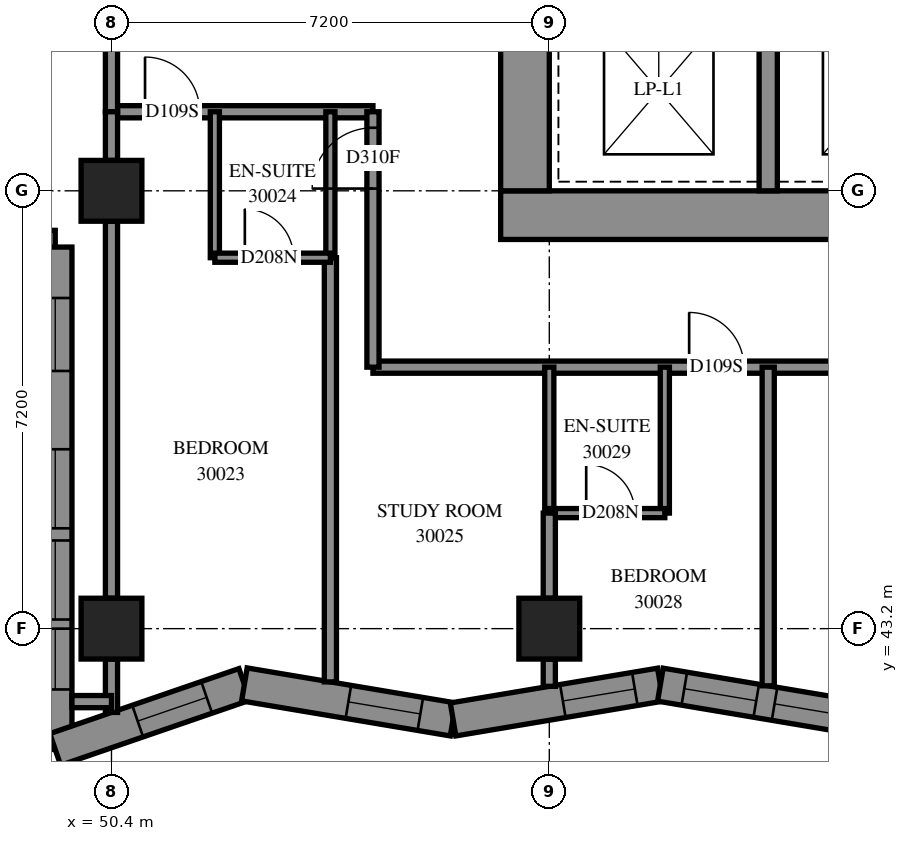
"""IFC4 building model, lengths in metres.
Left out: names, types, materials, properties, quantities, classifications, styles, units other than length and angle.
Written with IfcOpenShell. Run it as: python <this file> out.ifc"""

import sys

from ifc_helpers import new_model, si_unit, direction, frame, frame_2d, origin, origin_2d, place, context, subcontext, project, spatial, polyline, rectangle, outline, extrude, element, fill, save


model = new_model("IFC4")
c1 = context("Model", 3, precision=1e-05, world=origin(), true_north=direction((0.0, 1.0)))
c2 = subcontext(c1, "Body", "Model", "MODEL_VIEW")
j1 = project(units=[si_unit("LENGTHUNIT", "METRE"), si_unit("PLANEANGLEUNIT", "RADIAN")], contexts=[c1])
p1 = place(None, origin())
s1 = spatial("IfcSite", under=j1, at=p1, CompositionType="ELEMENT")
p2 = place(p1, origin())
s2 = spatial("IfcBuilding", under=s1, at=p2, CompositionType="ELEMENT")
p3 = place(p2, frame((0.0, 0.0, 111.8)))
s3 = spatial("IfcBuildingStorey", under=s2, at=p3, CompositionType="ELEMENT", Elevation=111.8)
for number, where, z_axis, x_axis in (
    (1, (50.4, 43.2, 0.0), (0.0, 0.0, 1.0), (1.0, 0.0, 0.0)),
    (2, (50.4, 50.4, 0.0), (0.0, 0.0, 1.0), (1.0, 0.0, 0.0)),
    (3, (57.6, 43.2, 0.0), (0.0, 0.0, 1.0), (1.0, 0.0, 0.0)),
):
    element("IfcColumn", number, at=place(p3, frame(where, z_axis=z_axis, x_axis=x_axis)), inside=s3, PredefinedType="COLUMN", context=c2, shape_type="SweptSolid", body=[
        extrude(rectangle(XDim=1.0, YDim=1.0, at=origin_2d()), origin(), (0.0, 0.0, 1.0), 3.1),
    ])
p4 = place(p3, frame((56.8, 50.0, -0.3), z_axis=(0.0, 0.0, 1.0), x_axis=(1.0, 0.0, 0.0)))
e4 = element("IfcWall", 4, at=p4, inside=s3, PredefinedType="SHEAR", context=c2, shape_type="SweptSolid", body=[
    extrude(rectangle(XDim=16.0, YDim=0.8, at=frame_2d((8.0, 0.0))), origin(), (0.0, 0.0, 1.0), 2.7),
])
p5 = place(p3, frame((57.2, 50.4, -0.3), z_axis=(0.0, 0.0, 1.0), x_axis=(0.0, 1.0, 0.0)))
e5 = element("IfcWall", 5, at=p5, inside=s3, PredefinedType="SHEAR", context=c2, shape_type="SweptSolid", body=[
    extrude(rectangle(XDim=14.4, YDim=0.8, at=frame_2d((7.2, 0.0))), origin(), (0.0, 0.0, 1.0), 2.7),
])
p6 = place(p5, frame((4.55, 0.0, 0.3)))
e6 = element("IfcOpeningElement", 6, at=p6, cuts=e5, PredefinedType="OPENING", context=c2, shape_type="SweptSolid", body=[
    extrude(rectangle(XDim=1.1, YDim=2.1, at=frame_2d((0.55, 1.05))), frame((0.0, 0.41, 0.0), z_axis=(0.0, -1.0, 0.0), x_axis=(1.0, 0.0, 0.0)), (0.0, 0.0, 1.0), 0.82),
])
p7 = place(p5, frame((11.35, 0.0, 0.3)))
e7 = element("IfcOpeningElement", 7, at=p7, cuts=e5, PredefinedType="OPENING", context=c2, shape_type="SweptSolid", body=[
    extrude(rectangle(XDim=1.1, YDim=2.1, at=frame_2d((0.55, 1.05))), frame((0.0, 0.41, 0.0), z_axis=(0.0, -1.0, 0.0), x_axis=(1.0, 0.0, 0.0)), (0.0, 0.0, 1.0), 0.82),
])
p8 = place(p3, frame((61.2, 50.4, 0.0), z_axis=(0.0, 0.0, 1.0), x_axis=(0.0, 1.0, 0.0)))
e8 = element("IfcWall", 8, at=p8, inside=s3, PredefinedType="SOLIDWALL", context=c2, shape_type="SweptSolid", body=[
    extrude(rectangle(XDim=3.3, YDim=0.3, at=frame_2d((1.65, 0.0))), origin(), (0.0, 0.0, 1.0), 3.1),
])
p9 = place(p3, frame((42.275, 49.475, 0.0), z_axis=(0.0, 0.0, 1.0), x_axis=(1.0, 0.0, 0.0)))
e9 = element("IfcWall", 9, at=p9, inside=s3, PredefinedType="SOLIDWALL", context=c2, shape_type="SweptSolid", body=[
    extrude(outline(polyline([(-0.275, -0.275), (6.925, -0.275), (7.475, 0.275), (0.275, 0.275), (-0.275, -0.275)])), origin(), (0.0, 0.0, 1.0), 3.1),
])
p10 = place(p9, frame((1.325, 0.0, 0.5)))
e10 = element("IfcOpeningElement", 10, at=p10, cuts=e9, PredefinedType="OPENING", context=c2, shape_type="SweptSolid", body=[
    extrude(rectangle(XDim=1.3, YDim=2.45, at=frame_2d((0.65, 1.225))), frame((0.0, 0.285, 0.0), z_axis=(0.0, -1.0, 0.0), x_axis=(1.0, 0.0, 0.0)), (0.0, 0.0, 1.0), 0.57),
])
p11 = place(p9, frame((2.825, 0.0, 0.5)))
e11 = element("IfcOpeningElement", 11, at=p11, cuts=e9, PredefinedType="OPENING", context=c2, shape_type="SweptSolid", body=[
    extrude(rectangle(XDim=1.3, YDim=2.45, at=frame_2d((0.65, 1.225))), frame((0.0, 0.285, 0.0), z_axis=(0.0, -1.0, 0.0), x_axis=(1.0, 0.0, 0.0)), (0.0, 0.0, 1.0), 0.57),
])
p12 = place(p9, frame((5.162, 0.0, 0.5)))
e12 = element("IfcOpeningElement", 12, at=p12, cuts=e9, PredefinedType="OPENING", context=c2, shape_type="SweptSolid", body=[
    extrude(rectangle(XDim=1.2, YDim=2.45, at=frame_2d((0.6, 1.225))), frame((0.0, 0.285, 0.0), z_axis=(0.0, -1.0, 0.0), x_axis=(1.0, 0.0, 0.0)), (0.0, 0.0, 1.0), 0.57),
])
p13 = place(p3, frame((49.475, 49.475, 0.0), z_axis=(0.0, 0.0, 1.0), x_axis=(0.0, -1.0, 0.0)))
e13 = element("IfcWall", 13, at=p13, inside=s3, PredefinedType="SOLIDWALL", context=c2, shape_type="SweptSolid", body=[
    extrude(outline(polyline([(0.275, -0.275), (8.647, -0.275), (7.876, 0.275), (-0.275, 0.275), (0.275, -0.275)])), origin(), (0.0, 0.0, 1.0), 3.1),
])
p14 = place(p13, frame((3.325, 0.0, 0.5)))
e14 = element("IfcOpeningElement", 14, at=p14, cuts=e13, PredefinedType="OPENING", context=c2, shape_type="SweptSolid", body=[
    extrude(rectangle(XDim=1.3, YDim=2.45, at=frame_2d((0.65, 1.225))), frame((0.0, 0.285, 0.0), z_axis=(0.0, -1.0, 0.0), x_axis=(1.0, 0.0, 0.0)), (0.0, 0.0, 1.0), 0.57),
])
p15 = place(p13, frame((4.825, 0.0, 0.5)))
e15 = element("IfcOpeningElement", 15, at=p15, cuts=e13, PredefinedType="OPENING", context=c2, shape_type="SweptSolid", body=[
    extrude(rectangle(XDim=1.3, YDim=2.45, at=frame_2d((0.65, 1.225))), frame((0.0, 0.285, 0.0), z_axis=(0.0, -1.0, 0.0), x_axis=(1.0, 0.0, 0.0)), (0.0, 0.0, 1.0), 0.57),
])
p16 = place(p13, frame((0.838, 0.0, 0.5)))
e16 = element("IfcOpeningElement", 16, at=p16, cuts=e13, PredefinedType="OPENING", context=c2, shape_type="SweptSolid", body=[
    extrude(rectangle(XDim=1.2, YDim=2.45, at=frame_2d((0.6, 1.225))), frame((0.0, 0.285, 0.0), z_axis=(0.0, -1.0, 0.0), x_axis=(1.0, 0.0, 0.0)), (0.0, 0.0, 1.0), 0.57),
])
p17 = place(p13, frame((6.275, 0.0, 0.45)))
e17 = element("IfcOpeningElement", 17, at=p17, cuts=e13, PredefinedType="OPENING", context=c2, shape_type="SweptSolid", body=[
    extrude(rectangle(XDim=1.0, YDim=2.5, at=frame_2d((0.5, 1.25))), frame((0.0, 0.285, 0.0), z_axis=(0.0, -1.0, 0.0), x_axis=(1.0, 0.0, 0.0)), (0.0, 0.0, 1.0), 0.57),
])
p18 = place(p3, frame((49.475, 41.213, 0.0), z_axis=(0.0, 0.0, 1.0), x_axis=(0.9456585559, 0.3251613379, 0.0)))
e18 = element("IfcWall", 18, at=p18, inside=s3, PredefinedType="SOLIDWALL", context=c2, shape_type="SweptSolid", body=[
    extrude(outline(polyline([(-0.385, -0.275), (3.219, -0.275), (3.359, 0.275), (0.385, 0.275), (-0.385, -0.275)])), origin(), (0.0, 0.0, 1.0), 3.1),
])
p19 = place(p18, frame((1.434, 0.0, 0.5)))
e19 = element("IfcOpeningElement", 19, at=p19, cuts=e18, PredefinedType="OPENING", context=c2, shape_type="SweptSolid", body=[
    extrude(rectangle(XDim=1.2, YDim=2.45, at=frame_2d((0.6, 1.225))), frame((0.0, 0.285, 0.0), z_axis=(0.0, -1.0, 0.0), x_axis=(1.0, 0.0, 0.0)), (0.0, 0.0, 1.0), 0.57),
])
p20 = place(p3, frame((52.585, 42.283, 0.0), z_axis=(0.0, 0.0, 1.0), x_axis=(0.9862084709, -0.1655078606, 0.0)))
e20 = element("IfcWall", 20, at=p20, inside=s3, PredefinedType="SOLIDWALL", context=c2, shape_type="SweptSolid", body=[
    extrude(outline(polyline([(0.07, -0.275), (3.526, -0.275), (3.434, 0.275), (-0.07, 0.275), (0.07, -0.275)])), origin(), (0.0, 0.0, 1.0), 3.1),
])
p21 = place(p20, frame((1.734, 0.0, 0.5)))
e21 = element("IfcOpeningElement", 21, at=p21, cuts=e20, PredefinedType="OPENING", context=c2, shape_type="SweptSolid", body=[
    extrude(rectangle(XDim=1.2, YDim=2.45, at=frame_2d((0.6, 1.225))), frame((0.0, 0.285, 0.0), z_axis=(0.0, -1.0, 0.0), x_axis=(1.0, 0.0, 0.0)), (0.0, 0.0, 1.0), 0.57),
])
p22 = place(p3, frame((56.018, 41.707, 0.0), z_axis=(0.0, 0.0, 1.0), x_axis=(0.9862119159, 0.1654873316, 0.0)))
e22 = element("IfcWall", 22, at=p22, inside=s3, PredefinedType="SOLIDWALL", context=c2, shape_type="SweptSolid", body=[
    extrude(outline(polyline([(-0.046, -0.275), (3.41, -0.275), (3.503, 0.275), (0.046, 0.275), (-0.046, -0.275)])), origin(), (0.0, 0.0, 1.0), 3.1),
])
p23 = place(p22, frame((1.831, 0.0, 0.5)))
e23 = element("IfcOpeningElement", 23, at=p23, cuts=e22, PredefinedType="OPENING", context=c2, shape_type="SweptSolid", body=[
    extrude(rectangle(XDim=1.2, YDim=2.45, at=frame_2d((0.6, 1.225))), frame((0.0, 0.285, 0.0), z_axis=(0.0, -1.0, 0.0), x_axis=(1.0, 0.0, 0.0)), (0.0, 0.0, 1.0), 0.57),
])
p24 = place(p3, frame((59.426, 42.279, 0.0), z_axis=(0.0, 0.0, 1.0), x_axis=(0.9862119159, -0.1654873316, 0.0)))
e24 = element("IfcWall", 24, at=p24, inside=s3, PredefinedType="SOLIDWALL", context=c2, shape_type="SweptSolid", body=[
    extrude(outline(polyline([(0.046, -0.275), (3.503, -0.275), (3.41, 0.275), (-0.046, 0.275), (0.046, -0.275)])), origin(), (0.0, 0.0, 1.0), 3.1),
])
p25 = place(p24, frame((0.399, 0.0, 0.5)))
e25 = element("IfcOpeningElement", 25, at=p25, cuts=e24, PredefinedType="OPENING", context=c2, shape_type="SweptSolid", body=[
    extrude(rectangle(XDim=1.2, YDim=2.45, at=frame_2d((0.6, 1.225))), frame((0.0, 0.285, 0.0), z_axis=(0.0, -1.0, 0.0), x_axis=(1.0, 0.0, 0.0)), (0.0, 0.0, 1.0), 0.57),
])
p26 = place(p24, frame((1.904, 0.0, 0.5)))
e26 = element("IfcOpeningElement", 26, at=p26, cuts=e24, PredefinedType="OPENING", context=c2, shape_type="SweptSolid", body=[
    extrude(rectangle(XDim=1.2, YDim=2.45, at=frame_2d((0.6, 1.225))), frame((0.0, 0.285, 0.0), z_axis=(0.0, -1.0, 0.0), x_axis=(1.0, 0.0, 0.0)), (0.0, 0.0, 1.0), 0.57),
])
p27 = place(p3, frame((54.7, 47.5, 0.0), z_axis=(0.0, 0.0, 1.0), x_axis=(1.0, 0.0, 0.0)))
e27 = element("IfcWall", 27, at=p27, inside=s3, PredefinedType="PARTITIONING", context=c2, shape_type="SweptSolid", body=[
    extrude(rectangle(XDim=19.442, YDim=0.2, at=frame_2d((9.721, 0.0))), origin(), (0.0, 0.0, 1.0), 3.1),
])
p28 = place(p27, frame((5.2, 0.0, 0.0)))
e28 = element("IfcOpeningElement", 28, at=p28, cuts=e27, PredefinedType="OPENING", context=c2, shape_type="SweptSolid", body=[
    extrude(rectangle(XDim=0.9, YDim=2.1, at=frame_2d((0.45, 1.05))), frame((0.0, 0.11, 0.0), z_axis=(0.0, -1.0, 0.0), x_axis=(1.0, 0.0, 0.0)), (0.0, 0.0, 1.0), 0.22),
])
p29 = place(p27, frame((8.757, 0.0, 0.0)))
e29 = element("IfcOpeningElement", 29, at=p29, cuts=e27, PredefinedType="OPENING", context=c2, shape_type="SweptSolid", body=[
    extrude(rectangle(XDim=0.9, YDim=2.1, at=frame_2d((0.45, 1.05))), frame((0.0, 0.11, 0.0), z_axis=(0.0, -1.0, 0.0), x_axis=(1.0, 0.0, 0.0)), (0.0, 0.0, 1.0), 0.22),
])
p30 = place(p27, frame((14.05, 0.0, 0.0)))
e30 = element("IfcOpeningElement", 30, at=p30, cuts=e27, PredefinedType="OPENING", context=c2, shape_type="SweptSolid", body=[
    extrude(rectangle(XDim=0.9, YDim=2.1, at=frame_2d((0.45, 1.05))), frame((0.0, 0.11, 0.0), z_axis=(0.0, -1.0, 0.0), x_axis=(1.0, 0.0, 0.0)), (0.0, 0.0, 1.0), 0.22),
])
p31 = place(p3, frame((54.0, 42.324, 0.0), z_axis=(0.0, 0.0, 1.0), x_axis=(0.0, 1.0, 0.0)))
e31 = element("IfcWall", 31, at=p31, inside=s3, PredefinedType="PARTITIONING", context=c2, shape_type="SweptSolid", body=[
    extrude(rectangle(XDim=6.976, YDim=0.2, at=frame_2d((3.488, 0.0))), origin(), (0.0, 0.0, 1.0), 3.1),
])
p32 = place(p3, frame((50.4, 43.7, 0.0), z_axis=(0.0, 0.0, 1.0), x_axis=(0.0, 1.0, 0.0)))
e32 = element("IfcWall", 32, at=p32, inside=s3, PredefinedType="PARTITIONING", context=c2, shape_type="SweptSolid", body=[
    extrude(rectangle(XDim=6.2, YDim=0.2, at=frame_2d((3.1, 0.0))), origin(), (0.0, 0.0, 1.0), 2.6),
])
p33 = place(p3, frame((61.2, 42.26, 0.0), z_axis=(0.0, 0.0, 1.0), x_axis=(0.0, 1.0, 0.0)))
e33 = element("IfcWall", 33, at=p33, inside=s3, PredefinedType="PARTITIONING", context=c2, shape_type="SweptSolid", body=[
    extrude(rectangle(XDim=5.24, YDim=0.2, at=frame_2d((2.62, 0.0))), origin(), (0.0, 0.0, 1.0), 3.1),
])
p34 = place(p3, frame((50.4, 51.7, 0.0), z_axis=(0.0, 0.0, 1.0), x_axis=(1.0, 0.0, 0.0)))
e34 = element("IfcWall", 34, at=p34, inside=s3, PredefinedType="PARTITIONING", context=c2, shape_type="SweptSolid", body=[
    extrude(rectangle(XDim=4.3, YDim=0.2, at=frame_2d((2.15, 0.0))), origin(), (0.0, 0.0, 1.0), 3.1),
])
p35 = place(p34, frame((0.552, 0.0, 0.0)))
e35 = element("IfcOpeningElement", 35, at=p35, cuts=e34, PredefinedType="OPENING", context=c2, shape_type="SweptSolid", body=[
    extrude(rectangle(XDim=0.9, YDim=2.1, at=frame_2d((0.45, 1.05))), frame((0.0, 0.11, 0.0), z_axis=(0.0, -1.0, 0.0), x_axis=(1.0, 0.0, 0.0)), (0.0, 0.0, 1.0), 0.22),
])
p36 = place(p3, frame((54.7, 47.5, 0.0), z_axis=(0.0, 0.0, 1.0), x_axis=(0.0, 1.0, 0.0)))
e36 = element("IfcWall", 36, at=p36, inside=s3, PredefinedType="PARTITIONING", context=c2, shape_type="SweptSolid", body=[
    extrude(rectangle(XDim=4.2, YDim=0.2, at=frame_2d((2.1, 0.0))), origin(), (0.0, 0.0, 1.0), 3.1),
])
p37 = place(p36, frame((2.937, 0.0, 0.0)))
e37 = element("IfcOpeningElement", 37, at=p37, cuts=e36, PredefinedType="OPENING", context=c2, shape_type="SweptSolid", body=[
    extrude(rectangle(XDim=1.0, YDim=2.1, at=frame_2d((0.5, 1.05))), frame((0.0, 0.11, 0.0), z_axis=(0.0, -1.0, 0.0), x_axis=(1.0, 0.0, 0.0)), (0.0, 0.0, 1.0), 0.22),
])
for number, where, z_axis, x_axis in (
    (38, (52.1, 49.3, 0.0), (0.0, 0.0, 1.0), (0.0, 1.0, 0.0)),
    (39, (54.0, 49.3, 0.0), (0.0, 0.0, 1.0), (0.0, 1.0, 0.0)),
    (40, (59.5, 45.1, 0.0), (0.0, 0.0, 1.0), (0.0, 1.0, 0.0)),
    (41, (57.6, 45.1, 0.0), (0.0, 0.0, 1.0), (0.0, 1.0, 0.0)),
):
    element("IfcWall", number, at=place(p3, frame(where, z_axis=z_axis, x_axis=x_axis)), inside=s3, PredefinedType="PARTITIONING", context=c2, shape_type="SweptSolid", body=[
        extrude(rectangle(XDim=2.4, YDim=0.15, at=frame_2d((1.2, 0.0))), origin(), (0.0, 0.0, 1.0), 3.1),
    ])
p38 = place(p3, frame((50.4, 51.7, 0.0), z_axis=(0.0, 0.0, 1.0), x_axis=(0.0, 1.0, 0.0)))
e42 = element("IfcWall", 42, at=p38, inside=s3, PredefinedType="PARTITIONING", context=c2, shape_type="SweptSolid", body=[
    extrude(rectangle(XDim=2.2, YDim=0.2, at=frame_2d((1.1, 0.0))), origin(), (0.0, 0.0, 1.0), 3.1),
])
p39 = place(p3, frame((52.1, 49.3, 0.0), z_axis=(0.0, 0.0, 1.0), x_axis=(1.0, 0.0, 0.0)))
e43 = element("IfcWall", 43, at=p39, inside=s3, PredefinedType="PARTITIONING", context=c2, shape_type="SweptSolid", body=[
    extrude(rectangle(XDim=1.9, YDim=0.15, at=frame_2d((0.95, 0.0))), origin(), (0.0, 0.0, 1.0), 3.1),
])
p40 = place(p39, frame((0.493, 0.0, 0.0)))
e44 = element("IfcOpeningElement", 44, at=p40, cuts=e43, PredefinedType="OPENING", context=c2, shape_type="SweptSolid", body=[
    extrude(rectangle(XDim=0.8, YDim=2.1, at=frame_2d((0.4, 1.05))), frame((0.0, 0.085, 0.0), z_axis=(0.0, -1.0, 0.0), x_axis=(1.0, 0.0, 0.0)), (0.0, 0.0, 1.0), 0.17),
])
p41 = place(p3, frame((57.6, 45.1, 0.0), z_axis=(0.0, 0.0, 1.0), x_axis=(1.0, 0.0, 0.0)))
e45 = element("IfcWall", 45, at=p41, inside=s3, PredefinedType="PARTITIONING", context=c2, shape_type="SweptSolid", body=[
    extrude(rectangle(XDim=1.9, YDim=0.15, at=frame_2d((0.95, 0.0))), origin(), (0.0, 0.0, 1.0), 3.1),
])
p42 = place(p41, frame((0.607, 0.0, 0.0)))
e46 = element("IfcOpeningElement", 46, at=p42, cuts=e45, PredefinedType="OPENING", context=c2, shape_type="SweptSolid", body=[
    extrude(rectangle(XDim=0.8, YDim=2.1, at=frame_2d((0.4, 1.05))), frame((0.0, 0.085, 0.0), z_axis=(0.0, -1.0, 0.0), x_axis=(1.0, 0.0, 0.0)), (0.0, 0.0, 1.0), 0.17),
])
p43 = place(p3, frame((57.6, 43.7, 0.0), z_axis=(0.0, 0.0, 1.0), x_axis=(0.0, 1.0, 0.0)))
e47 = element("IfcWall", 47, at=p43, inside=s3, PredefinedType="PARTITIONING", context=c2, shape_type="SweptSolid", body=[
    extrude(rectangle(XDim=1.4, YDim=0.2, at=frame_2d((0.7, 0.0))), origin(), (0.0, 0.0, 1.0), 3.1),
])
p44 = place(p3, frame((50.4, 50.9, 0.0), z_axis=(0.0, 0.0, 1.0), x_axis=(0.0, 1.0, 0.0)))
e48 = element("IfcWall", 48, at=p44, inside=s3, PredefinedType="PARTITIONING", context=c2, shape_type="SweptSolid", body=[
    extrude(rectangle(XDim=0.8, YDim=0.2, at=frame_2d((0.4, 0.0))), origin(), (0.0, 0.0, 1.0), 3.1),
])
p45 = place(p3, frame((50.4, 41.822, 0.0), z_axis=(0.0, 0.0, 1.0), x_axis=(0.0, 1.0, 0.0)))
e49 = element("IfcWall", 49, at=p45, inside=s3, PredefinedType="PARTITIONING", context=c2, shape_type="SweptSolid", body=[
    extrude(rectangle(XDim=0.878, YDim=0.2, at=frame_2d((0.439, 0.0))), origin(), (0.0, 0.0, 1.0), 3.1),
])
p46 = place(p3, frame((49.75, 42.0, 0.0), z_axis=(0.0, 0.0, 1.0), x_axis=(1.0, 0.0, 0.0)))
e50 = element("IfcWall", 50, at=p46, inside=s3, PredefinedType="PARTITIONING", context=c2, shape_type="SweptSolid", body=[
    extrude(rectangle(XDim=0.65, YDim=0.2, at=frame_2d((0.325, 0.0))), origin(), (0.0, 0.0, 1.0), 3.1),
])
p47 = place(p3, frame((57.6, 42.251, 0.0), z_axis=(0.0, 0.0, 1.0), x_axis=(0.0, 1.0, 0.0)))
e51 = element("IfcWall", 51, at=p47, inside=s3, PredefinedType="PARTITIONING", context=c2, shape_type="SweptSolid", body=[
    extrude(rectangle(XDim=0.449, YDim=0.2, at=frame_2d((0.224, 0.0))), origin(), (0.0, 0.0, 1.0), 3.1),
])
p48 = place(p14, origin())
e52 = element("IfcWindow", 52, at=p48, inside=s3, PartitioningType="SINGLE_PANEL", PredefinedType="WINDOW", context=c2, shape_type="SweptSolid", body=[
    extrude(rectangle(XDim=1.3, YDim=2.45, at=frame_2d((0.65, 1.225))), frame((0.0, 0.155, 0.0), z_axis=(0.0, -1.0, 0.0), x_axis=(1.0, 0.0, 0.0)), (0.0, 0.0, 1.0), 0.06),
])
fill(e14, e52)
p49 = place(p15, origin())
e53 = element("IfcWindow", 53, at=p49, inside=s3, PartitioningType="SINGLE_PANEL", PredefinedType="WINDOW", context=c2, shape_type="SweptSolid", body=[
    extrude(rectangle(XDim=1.3, YDim=2.45, at=frame_2d((0.65, 1.225))), frame((0.0, 0.155, 0.0), z_axis=(0.0, -1.0, 0.0), x_axis=(1.0, 0.0, 0.0)), (0.0, 0.0, 1.0), 0.06),
])
fill(e15, e53)
p50 = place(p16, origin())
e54 = element("IfcWindow", 54, at=p50, inside=s3, PartitioningType="SINGLE_PANEL", PredefinedType="WINDOW", context=c2, shape_type="SweptSolid", body=[
    extrude(rectangle(XDim=1.2, YDim=2.45, at=frame_2d((0.6, 1.225))), frame((0.0, 0.155, 0.0), z_axis=(0.0, -1.0, 0.0), x_axis=(1.0, 0.0, 0.0)), (0.0, 0.0, 1.0), 0.06),
])
fill(e16, e54)
p51 = place(p19, origin())
e55 = element("IfcWindow", 55, at=p51, inside=s3, PartitioningType="SINGLE_PANEL", PredefinedType="WINDOW", context=c2, shape_type="SweptSolid", body=[
    extrude(rectangle(XDim=1.2, YDim=2.45, at=frame_2d((0.6, 1.225))), frame((0.0, 0.155, 0.0), z_axis=(0.0, -1.0, 0.0), x_axis=(1.0, 0.0, 0.0)), (0.0, 0.0, 1.0), 0.06),
])
fill(e19, e55)
p52 = place(p21, origin())
e56 = element("IfcWindow", 56, at=p52, inside=s3, PartitioningType="SINGLE_PANEL", PredefinedType="WINDOW", context=c2, shape_type="SweptSolid", body=[
    extrude(rectangle(XDim=1.2, YDim=2.45, at=frame_2d((0.6, 1.225))), frame((0.0, 0.155, 0.0), z_axis=(0.0, -1.0, 0.0), x_axis=(1.0, 0.0, 0.0)), (0.0, 0.0, 1.0), 0.06),
])
fill(e21, e56)
p53 = place(p23, origin())
e57 = element("IfcWindow", 57, at=p53, inside=s3, PartitioningType="SINGLE_PANEL", PredefinedType="WINDOW", context=c2, shape_type="SweptSolid", body=[
    extrude(rectangle(XDim=1.2, YDim=2.45, at=frame_2d((0.6, 1.225))), frame((0.0, 0.155, 0.0), z_axis=(0.0, -1.0, 0.0), x_axis=(1.0, 0.0, 0.0)), (0.0, 0.0, 1.0), 0.06),
])
fill(e23, e57)
p54 = place(p25, origin())
e58 = element("IfcWindow", 58, at=p54, inside=s3, PartitioningType="SINGLE_PANEL", PredefinedType="WINDOW", context=c2, shape_type="SweptSolid", body=[
    extrude(rectangle(XDim=1.2, YDim=2.45, at=frame_2d((0.6, 1.225))), frame((0.0, 0.155, 0.0), z_axis=(0.0, -1.0, 0.0), x_axis=(1.0, 0.0, 0.0)), (0.0, 0.0, 1.0), 0.06),
])
fill(e25, e58)
p55 = place(p26, origin())
e59 = element("IfcWindow", 59, at=p55, inside=s3, PartitioningType="SINGLE_PANEL", PredefinedType="WINDOW", context=c2, shape_type="SweptSolid", body=[
    extrude(rectangle(XDim=1.2, YDim=2.45, at=frame_2d((0.6, 1.225))), frame((0.0, 0.155, 0.0), z_axis=(0.0, -1.0, 0.0), x_axis=(1.0, 0.0, 0.0)), (0.0, 0.0, 1.0), 0.06),
])
fill(e26, e59)
p56 = place(p35, origin())
e60 = element("IfcDoor", 60, at=p56, inside=s3, OperationType="SINGLE_SWING_LEFT", PredefinedType="DOOR", context=c2, shape_type="SweptSolid", body=[
    extrude(rectangle(XDim=0.9, YDim=2.1, at=frame_2d((0.45, 1.05))), frame((0.0, 0.025, 0.0), z_axis=(0.0, -1.0, 0.0), x_axis=(1.0, 0.0, 0.0)), (0.0, 0.0, 1.0), 0.05),
])
fill(e35, e60)
p57 = place(p40, origin())
e61 = element("IfcDoor", 61, at=p57, inside=s3, OperationType="SINGLE_SWING_RIGHT", PredefinedType="DOOR", context=c2, shape_type="SweptSolid", body=[
    extrude(rectangle(XDim=0.8, YDim=2.1, at=frame_2d((0.4, 1.05))), frame((0.0, 0.025, 0.0), z_axis=(0.0, -1.0, 0.0), x_axis=(1.0, 0.0, 0.0)), (0.0, 0.0, 1.0), 0.05),
])
fill(e44, e61)
p58 = place(p37, origin())
e62 = element("IfcDoor", 62, at=p58, inside=s3, OperationType="SINGLE_SWING_RIGHT", PredefinedType="DOOR", context=c2, shape_type="SweptSolid", body=[
    extrude(rectangle(XDim=1.0, YDim=2.1, at=frame_2d((0.5, 1.05))), frame((0.0, 0.025, 0.0), z_axis=(0.0, -1.0, 0.0), x_axis=(1.0, 0.0, 0.0)), (0.0, 0.0, 1.0), 0.05),
])
fill(e37, e62)
p59 = place(p28, origin())
e63 = element("IfcDoor", 63, at=p59, inside=s3, OperationType="SINGLE_SWING_LEFT", PredefinedType="DOOR", context=c2, shape_type="SweptSolid", body=[
    extrude(rectangle(XDim=0.9, YDim=2.1, at=frame_2d((0.45, 1.05))), frame((0.0, 0.025, 0.0), z_axis=(0.0, -1.0, 0.0), x_axis=(1.0, 0.0, 0.0)), (0.0, 0.0, 1.0), 0.05),
])
fill(e28, e63)
p60 = place(p42, origin())
e64 = element("IfcDoor", 64, at=p60, inside=s3, OperationType="SINGLE_SWING_RIGHT", PredefinedType="DOOR", context=c2, shape_type="SweptSolid", body=[
    extrude(rectangle(XDim=0.8, YDim=2.1, at=frame_2d((0.4, 1.05))), frame((0.0, 0.025, 0.0), z_axis=(0.0, -1.0, 0.0), x_axis=(1.0, 0.0, 0.0)), (0.0, 0.0, 1.0), 0.05),
])
fill(e46, e64)
p61 = place(p17, origin())
e65 = element("IfcWindow", 65, at=p61, inside=s3, PartitioningType="SINGLE_PANEL", PredefinedType="WINDOW", context=c2, shape_type="SweptSolid", body=[
    extrude(rectangle(XDim=1.0, YDim=2.5, at=frame_2d((0.5, 1.25))), frame((0.0, 0.155, 0.0), z_axis=(0.0, -1.0, 0.0), x_axis=(1.0, 0.0, 0.0)), (0.0, 0.0, 1.0), 0.06),
])
fill(e17, e65)
save(model, sys.argv[1])
